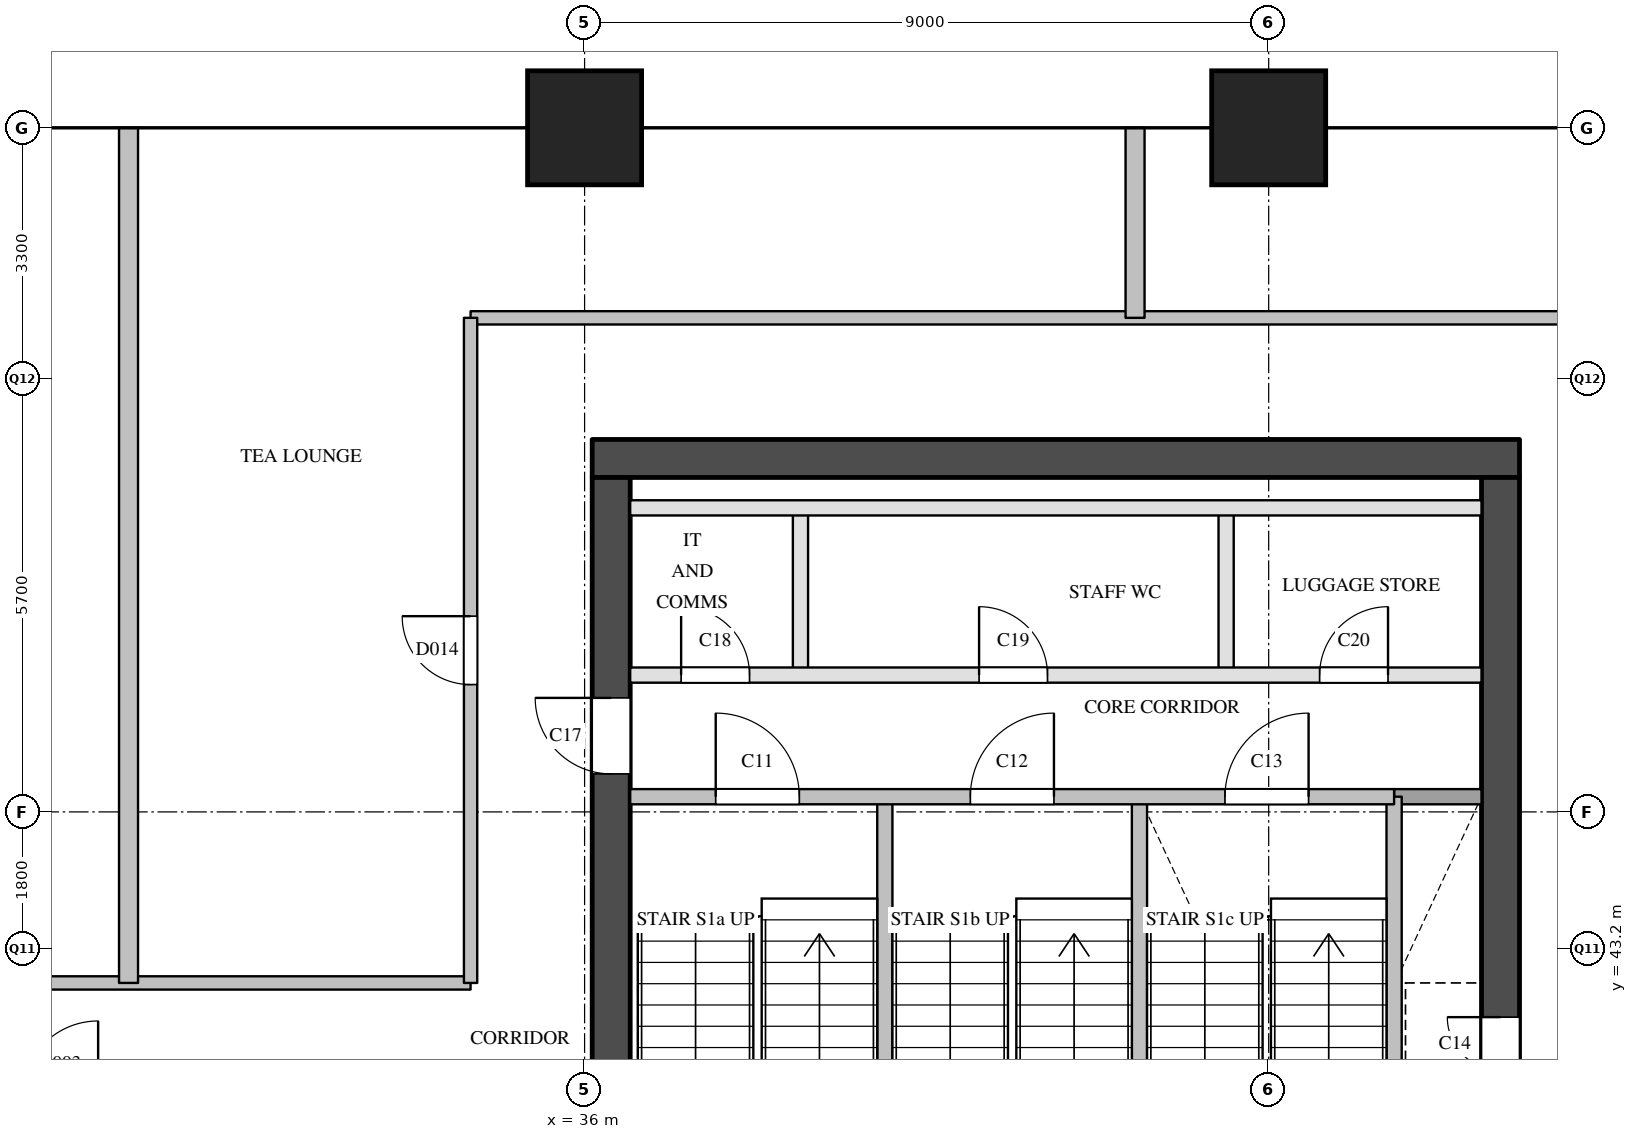
"""IFC4 building model, lengths in metres.
Left out: names, types, materials, properties, quantities, classifications, styles, units other than length and angle.
Written with IfcOpenShell. Run it as: python <this file> out.ifc"""

import sys

from ifc_helpers import new_model, si_unit, direction, frame, frame_2d, origin, origin_2d, place, context, subcontext, project, spatial, rectangle, extrude, element, fill, save


model = new_model("IFC4")
c1 = context("Model", 3, precision=1e-05, world=origin(), true_north=direction((0.0, 1.0)))
c2 = subcontext(c1, "Body", "Model", "MODEL_VIEW")
j1 = project(units=[si_unit("LENGTHUNIT", "METRE"), si_unit("PLANEANGLEUNIT", "RADIAN")], contexts=[c1])
p1 = place(None, origin())
s1 = spatial("IfcSite", under=j1, at=p1, CompositionType="ELEMENT")
p2 = place(p1, origin())
s2 = spatial("IfcBuilding", under=s1, at=p2, CompositionType="ELEMENT")
p3 = place(p2, frame((0.0, 0.0, 154.4)))
s3 = spatial("IfcBuildingStorey", under=s2, at=p3, CompositionType="ELEMENT", Elevation=154.4)
for number, where, z_axis, x_axis in (
    (1, (36.0, 54.0, 0.0), (0.0, 0.0, 1.0), (1.0, 0.0, 0.0)),
    (2, (45.0, 54.0, 0.0), (0.0, 0.0, 1.0), (1.0, 0.0, 0.0)),
):
    element("IfcColumn", number, at=place(p3, frame(where, z_axis=z_axis, x_axis=x_axis)), inside=s3, PredefinedType="COLUMN", context=c2, shape_type="SweptSolid", body=[
        extrude(rectangle(XDim=1.5, YDim=1.5, at=origin_2d()), origin(), (0.0, 0.0, 1.0), 3.9),
    ])
p4 = place(p3, frame((36.1, 49.65, 0.0), z_axis=(0.0, 0.0, 1.0), x_axis=(1.0, 0.0, 0.0)))
e3 = element("IfcWall", 3, at=p4, inside=s3, PredefinedType="SHEAR", context=c2, shape_type="SweptSolid", body=[
    extrude(rectangle(XDim=12.2, YDim=0.5, at=frame_2d((6.1, 0.0))), origin(), (0.0, 0.0, 1.0), 3.6),
])
p5 = place(p3, frame((36.35, 29.1, 0.0), z_axis=(0.0, 0.0, 1.0), x_axis=(0.0, 1.0, 0.0)))
e4 = element("IfcWall", 4, at=p5, inside=s3, PredefinedType="SHEAR", context=c2, shape_type="SweptSolid", body=[
    extrude(rectangle(XDim=20.3, YDim=0.5, at=frame_2d((10.15, 0.0))), origin(), (0.0, 0.0, 1.0), 3.6),
])
p6 = place(p5, frame((3.6, 0.0, 0.0)))
e5 = element("IfcOpeningElement", 5, at=p6, cuts=e4, PredefinedType="OPENING", context=c2, shape_type="SweptSolid", body=[
    extrude(rectangle(XDim=1.8, YDim=2.1, at=frame_2d((0.9, 1.05))), frame((0.0, 0.26, 0.0), z_axis=(0.0, -1.0, 0.0), x_axis=(1.0, 0.0, 0.0)), (0.0, 0.0, 1.0), 0.52),
])
p7 = place(p5, frame((16.4, 0.0, 0.0)))
e6 = element("IfcOpeningElement", 6, at=p7, cuts=e4, PredefinedType="OPENING", context=c2, shape_type="SweptSolid", body=[
    extrude(rectangle(XDim=1.0, YDim=2.1, at=frame_2d((0.5, 1.05))), frame((0.0, 0.26, 0.0), z_axis=(0.0, -1.0, 0.0), x_axis=(1.0, 0.0, 0.0)), (0.0, 0.0, 1.0), 0.52),
])
p8 = place(p3, frame((48.05, 29.1, 0.0), z_axis=(0.0, 0.0, 1.0), x_axis=(0.0, 1.0, 0.0)))
e7 = element("IfcWall", 7, at=p8, inside=s3, PredefinedType="SHEAR", context=c2, shape_type="SweptSolid", body=[
    extrude(rectangle(XDim=20.3, YDim=0.5, at=frame_2d((10.15, 0.0))), origin(), (0.0, 0.0, 1.0), 3.6),
])
p9 = place(p8, frame((12.5, 0.0, 0.0)))
e8 = element("IfcOpeningElement", 8, at=p9, cuts=e7, PredefinedType="OPENING", context=c2, shape_type="SweptSolid", body=[
    extrude(rectangle(XDim=0.7, YDim=2.1, at=frame_2d((0.35, 1.05))), frame((0.0, 0.26, 0.0), z_axis=(0.0, -1.0, 0.0), x_axis=(1.0, 0.0, 0.0)), (0.0, 0.0, 1.0), 0.52),
])
p10 = place(p8, frame((3.9, 0.0, 0.0)))
e9 = element("IfcOpeningElement", 9, at=p10, cuts=e7, PredefinedType="OPENING", context=c2, shape_type="SweptSolid", body=[
    extrude(rectangle(XDim=1.8, YDim=2.1, at=frame_2d((0.9, 1.05))), frame((0.0, 0.26, 0.0), z_axis=(0.0, -1.0, 0.0), x_axis=(1.0, 0.0, 0.0)), (0.0, 0.0, 1.0), 0.52),
])
p11 = place(p3, frame((38.84, 46.8, 0.0), z_axis=(0.0, 0.0, 1.0), x_axis=(0.0, 1.0, 0.0)))
e10 = element("IfcWall", 10, at=p11, inside=s3, PredefinedType="PARTITIONING", context=c2, shape_type="SweptSolid", body=[
    extrude(rectangle(XDim=2.2, YDim=0.2, at=frame_2d((1.1, 0.0))), origin(), (0.0, 0.0, 1.0), 3.6),
])
for number, where, z_axis, x_axis in (
    (11, (39.95, 40.78, 0.0), (0.0, 0.0, 1.0), (0.0, 1.0, 0.0)),
    (12, (43.3, 40.78, 0.0), (0.0, 0.0, 1.0), (0.0, 1.0, 0.0)),
):
    element("IfcWall", number, at=place(p3, frame(where, z_axis=z_axis, x_axis=x_axis)), inside=s3, PredefinedType="SOLIDWALL", context=c2, shape_type="SweptSolid", body=[
        extrude(rectangle(XDim=4.42, YDim=0.2, at=frame_2d((2.21, 0.0))), origin(), (0.0, 0.0, 1.0), 3.6),
    ])
p12 = place(p3, frame((44.44, 46.8, 0.0), z_axis=(0.0, 0.0, 1.0), x_axis=(0.0, 1.0, 0.0)))
e13 = element("IfcWall", 13, at=p12, inside=s3, PredefinedType="PARTITIONING", context=c2, shape_type="SweptSolid", body=[
    extrude(rectangle(XDim=2.2, YDim=0.2, at=frame_2d((1.1, 0.0))), origin(), (0.0, 0.0, 1.0), 3.6),
])
p13 = place(p3, frame((46.65, 40.78, 0.0), z_axis=(0.0, 0.0, 1.0), x_axis=(0.0, 1.0, 0.0)))
e14 = element("IfcWall", 14, at=p13, inside=s3, PredefinedType="SOLIDWALL", context=c2, shape_type="SweptSolid", body=[
    extrude(rectangle(XDim=4.42, YDim=0.2, at=frame_2d((2.21, 0.0))), origin(), (0.0, 0.0, 1.0), 3.6),
])
p14 = place(p3, frame((46.65, 45.2, 0.0), z_axis=(0.0, 0.0, 1.0), x_axis=(1.0, 0.0, 0.0)))
e15 = element("IfcWall", 15, at=p14, inside=s3, PredefinedType="SOLIDWALL", context=c2, shape_type="SweptSolid", body=[
    extrude(rectangle(XDim=1.15, YDim=0.2, at=frame_2d((0.575, 0.0))), origin(), (0.0, 0.0, 1.0), 3.6),
])
p15 = place(p3, frame((36.6, 45.2, 0.0), z_axis=(0.0, 0.0, 1.0), x_axis=(1.0, 0.0, 0.0)))
e16 = element("IfcWall", 16, at=p15, inside=s3, PredefinedType="SOLIDWALL", context=c2, shape_type="SweptSolid", body=[
    extrude(rectangle(XDim=10.05, YDim=0.2, at=frame_2d((5.025, 0.0))), origin(), (0.0, 0.0, 1.0), 3.6),
])
p16 = place(p15, frame((1.125, 0.0, 0.0)))
e17 = element("IfcOpeningElement", 17, at=p16, cuts=e16, PredefinedType="OPENING", context=c2, shape_type="SweptSolid", body=[
    extrude(rectangle(XDim=1.1, YDim=2.1, at=frame_2d((0.55, 1.05))), frame((0.0, 0.11, 0.0), z_axis=(0.0, -1.0, 0.0), x_axis=(1.0, 0.0, 0.0)), (0.0, 0.0, 1.0), 0.22),
])
p17 = place(p15, frame((4.475, 0.0, 0.0)))
e18 = element("IfcOpeningElement", 18, at=p17, cuts=e16, PredefinedType="OPENING", context=c2, shape_type="SweptSolid", body=[
    extrude(rectangle(XDim=1.1, YDim=2.1, at=frame_2d((0.55, 1.05))), frame((0.0, 0.11, 0.0), z_axis=(0.0, -1.0, 0.0), x_axis=(1.0, 0.0, 0.0)), (0.0, 0.0, 1.0), 0.22),
])
p18 = place(p15, frame((7.825, 0.0, 0.0)))
e19 = element("IfcOpeningElement", 19, at=p18, cuts=e16, PredefinedType="OPENING", context=c2, shape_type="SweptSolid", body=[
    extrude(rectangle(XDim=1.1, YDim=2.1, at=frame_2d((0.55, 1.05))), frame((0.0, 0.11, 0.0), z_axis=(0.0, -1.0, 0.0), x_axis=(1.0, 0.0, 0.0)), (0.0, 0.0, 1.0), 0.22),
])
p19 = place(p3, frame((36.6, 46.8, 0.0), z_axis=(0.0, 0.0, 1.0), x_axis=(1.0, 0.0, 0.0)))
e20 = element("IfcWall", 20, at=p19, inside=s3, PredefinedType="PARTITIONING", context=c2, shape_type="SweptSolid", body=[
    extrude(rectangle(XDim=11.2, YDim=0.2, at=frame_2d((5.6, 0.0))), origin(), (0.0, 0.0, 1.0), 3.6),
])
p20 = place(p19, frame((0.67, 0.0, 0.0)))
e21 = element("IfcOpeningElement", 21, at=p20, cuts=e20, PredefinedType="OPENING", context=c2, shape_type="SweptSolid", body=[
    extrude(rectangle(XDim=0.9, YDim=2.1, at=frame_2d((0.45, 1.05))), frame((0.0, 0.11, 0.0), z_axis=(0.0, -1.0, 0.0), x_axis=(1.0, 0.0, 0.0)), (0.0, 0.0, 1.0), 0.22),
])
p21 = place(p19, frame((4.59, 0.0, 0.0)))
e22 = element("IfcOpeningElement", 22, at=p21, cuts=e20, PredefinedType="OPENING", context=c2, shape_type="SweptSolid", body=[
    extrude(rectangle(XDim=0.9, YDim=2.1, at=frame_2d((0.45, 1.05))), frame((0.0, 0.11, 0.0), z_axis=(0.0, -1.0, 0.0), x_axis=(1.0, 0.0, 0.0)), (0.0, 0.0, 1.0), 0.22),
])
p22 = place(p19, frame((9.07, 0.0, 0.0)))
e23 = element("IfcOpeningElement", 23, at=p22, cuts=e20, PredefinedType="OPENING", context=c2, shape_type="SweptSolid", body=[
    extrude(rectangle(XDim=0.9, YDim=2.1, at=frame_2d((0.45, 1.05))), frame((0.0, 0.11, 0.0), z_axis=(0.0, -1.0, 0.0), x_axis=(1.0, 0.0, 0.0)), (0.0, 0.0, 1.0), 0.22),
])
p23 = place(p3, frame((36.6, 49.0, 0.0), z_axis=(0.0, 0.0, 1.0), x_axis=(1.0, 0.0, 0.0)))
e24 = element("IfcWall", 24, at=p23, inside=s3, PredefinedType="PARTITIONING", context=c2, shape_type="SweptSolid", body=[
    extrude(rectangle(XDim=11.2, YDim=0.2, at=frame_2d((5.6, 0.0))), origin(), (0.0, 0.0, 1.0), 3.6),
])
p24 = place(p3, frame((19.5, 42.75, 0.0), z_axis=(0.0, 0.0, 1.0), x_axis=(1.0, 0.0, 0.0)))
e25 = element("IfcWall", 25, at=p24, inside=s3, PredefinedType="PARTITIONING", context=c2, shape_type="SweptSolid", body=[
    extrude(rectangle(XDim=15.0, YDim=0.175, at=frame_2d((7.5, 0.0))), origin(), (0.0, 0.0, 1.0), 2.6),
])
p25 = place(p24, frame((4.8, 0.0, 0.0)))
e26 = element("IfcOpeningElement", 26, at=p25, cuts=e25, PredefinedType="OPENING", context=c2, shape_type="SweptSolid", body=[
    extrude(rectangle(XDim=0.9, YDim=2.1, at=frame_2d((0.45, 1.05))), frame((0.0, 0.097, 0.0), z_axis=(0.0, -1.0, 0.0), x_axis=(1.0, 0.0, 0.0)), (0.0, 0.0, 1.0), 0.195),
])
p26 = place(p3, frame((34.5, 51.5, 0.0), z_axis=(0.0, 0.0, 1.0), x_axis=(1.0, 0.0, 0.0)))
e27 = element("IfcWall", 27, at=p26, inside=s3, PredefinedType="PARTITIONING", context=c2, shape_type="SweptSolid", body=[
    extrude(rectangle(XDim=15.4, YDim=0.175, at=frame_2d((7.7, 0.0))), origin(), (0.0, 0.0, 1.0), 3.6),
])
p27 = place(p3, frame((34.5, 42.75, 0.0), z_axis=(0.0, 0.0, 1.0), x_axis=(0.0, 1.0, 0.0)))
e28 = element("IfcWall", 28, at=p27, inside=s3, PredefinedType="PARTITIONING", context=c2, shape_type="SweptSolid", body=[
    extrude(rectangle(XDim=8.75, YDim=0.175, at=frame_2d((4.375, 0.0))), origin(), (0.0, 0.0, 1.0), 3.6),
])
p28 = place(p27, frame((3.925, 0.0, 0.0)))
e29 = element("IfcOpeningElement", 29, at=p28, cuts=e28, PredefinedType="OPENING", context=c2, shape_type="SweptSolid", body=[
    extrude(rectangle(XDim=0.9, YDim=2.1, at=frame_2d((0.45, 1.05))), frame((0.0, 0.097, 0.0), z_axis=(0.0, -1.0, 0.0), x_axis=(1.0, 0.0, 0.0)), (0.0, 0.0, 1.0), 0.195),
])
p29 = place(p3, frame((30.0, 42.75, 0.0), z_axis=(0.0, 0.0, 1.0), x_axis=(0.0, 1.0, 0.0)))
e30 = element("IfcWall", 30, at=p29, inside=s3, PredefinedType="PARTITIONING", context=c2, shape_type="SweptSolid", body=[
    extrude(rectangle(XDim=11.25, YDim=0.25, at=frame_2d((5.625, 0.0))), origin(), (0.0, 0.0, 1.0), 2.6),
])
p30 = place(p3, frame((43.242, 51.5, 0.0), z_axis=(0.0, 0.0, 1.0), x_axis=(0.0, 1.0, 0.0)))
e31 = element("IfcWall", 31, at=p30, inside=s3, PredefinedType="PARTITIONING", context=c2, shape_type="SweptSolid", body=[
    extrude(rectangle(XDim=2.5, YDim=0.25, at=frame_2d((1.25, 0.0))), origin(), (0.0, 0.0, 1.0), 2.6),
])
p31 = place(p16, origin())
e32 = element("IfcDoor", 32, at=p31, inside=s3, OperationType="SINGLE_SWING_LEFT", PredefinedType="DOOR", context=c2, shape_type="SweptSolid", body=[
    extrude(rectangle(XDim=1.1, YDim=2.1, at=frame_2d((0.55, 1.05))), frame((0.0, 0.025, 0.0), z_axis=(0.0, -1.0, 0.0), x_axis=(1.0, 0.0, 0.0)), (0.0, 0.0, 1.0), 0.05),
])
fill(e17, e32)
p32 = place(p17, origin())
e33 = element("IfcDoor", 33, at=p32, inside=s3, OperationType="SINGLE_SWING_RIGHT", PredefinedType="DOOR", context=c2, shape_type="SweptSolid", body=[
    extrude(rectangle(XDim=1.1, YDim=2.1, at=frame_2d((0.55, 1.05))), frame((0.0, 0.025, 0.0), z_axis=(0.0, -1.0, 0.0), x_axis=(1.0, 0.0, 0.0)), (0.0, 0.0, 1.0), 0.05),
])
fill(e18, e33)
p33 = place(p18, origin())
e34 = element("IfcDoor", 34, at=p33, inside=s3, OperationType="SINGLE_SWING_RIGHT", PredefinedType="DOOR", context=c2, shape_type="SweptSolid", body=[
    extrude(rectangle(XDim=1.1, YDim=2.1, at=frame_2d((0.55, 1.05))), frame((0.0, 0.025, 0.0), z_axis=(0.0, -1.0, 0.0), x_axis=(1.0, 0.0, 0.0)), (0.0, 0.0, 1.0), 0.05),
])
fill(e19, e34)
p34 = place(p9, origin())
e35 = element("IfcDoor", 35, at=p34, inside=s3, OperationType="SINGLE_SWING_RIGHT", PredefinedType="DOOR", context=c2, shape_type="SweptSolid", body=[
    extrude(rectangle(XDim=0.7, YDim=2.1, at=frame_2d((0.35, 1.05))), frame((0.0, 0.025, 0.0), z_axis=(0.0, -1.0, 0.0), x_axis=(1.0, 0.0, 0.0)), (0.0, 0.0, 1.0), 0.05),
])
fill(e8, e35)
p35 = place(p7, origin())
e36 = element("IfcDoor", 36, at=p35, inside=s3, OperationType="SINGLE_SWING_RIGHT", PredefinedType="DOOR", context=c2, shape_type="SweptSolid", body=[
    extrude(rectangle(XDim=1.0, YDim=2.1, at=frame_2d((0.5, 1.05))), frame((0.0, 0.025, 0.0), z_axis=(0.0, -1.0, 0.0), x_axis=(1.0, 0.0, 0.0)), (0.0, 0.0, 1.0), 0.05),
])
fill(e6, e36)
p36 = place(p20, origin())
e37 = element("IfcDoor", 37, at=p36, inside=s3, OperationType="SINGLE_SWING_LEFT", PredefinedType="DOOR", context=c2, shape_type="SweptSolid", body=[
    extrude(rectangle(XDim=0.9, YDim=2.1, at=frame_2d((0.45, 1.05))), frame((0.0, 0.025, 0.0), z_axis=(0.0, -1.0, 0.0), x_axis=(1.0, 0.0, 0.0)), (0.0, 0.0, 1.0), 0.05),
])
fill(e21, e37)
p37 = place(p21, origin())
e38 = element("IfcDoor", 38, at=p37, inside=s3, OperationType="SINGLE_SWING_LEFT", PredefinedType="DOOR", context=c2, shape_type="SweptSolid", body=[
    extrude(rectangle(XDim=0.9, YDim=2.1, at=frame_2d((0.45, 1.05))), frame((0.0, 0.025, 0.0), z_axis=(0.0, -1.0, 0.0), x_axis=(1.0, 0.0, 0.0)), (0.0, 0.0, 1.0), 0.05),
])
fill(e22, e38)
p38 = place(p22, origin())
e39 = element("IfcDoor", 39, at=p38, inside=s3, OperationType="SINGLE_SWING_RIGHT", PredefinedType="DOOR", context=c2, shape_type="SweptSolid", body=[
    extrude(rectangle(XDim=0.9, YDim=2.1, at=frame_2d((0.45, 1.05))), frame((0.0, 0.025, 0.0), z_axis=(0.0, -1.0, 0.0), x_axis=(1.0, 0.0, 0.0)), (0.0, 0.0, 1.0), 0.05),
])
fill(e23, e39)
p39 = place(p28, origin())
e40 = element("IfcDoor", 40, at=p39, inside=s3, OperationType="SINGLE_SWING_RIGHT", PredefinedType="DOOR", context=c2, shape_type="SweptSolid", body=[
    extrude(rectangle(XDim=0.9, YDim=2.1, at=frame_2d((0.45, 1.05))), frame((0.0, 0.025, 0.0), z_axis=(0.0, -1.0, 0.0), x_axis=(1.0, 0.0, 0.0)), (0.0, 0.0, 1.0), 0.05),
])
fill(e29, e40)
save(model, sys.argv[1])
